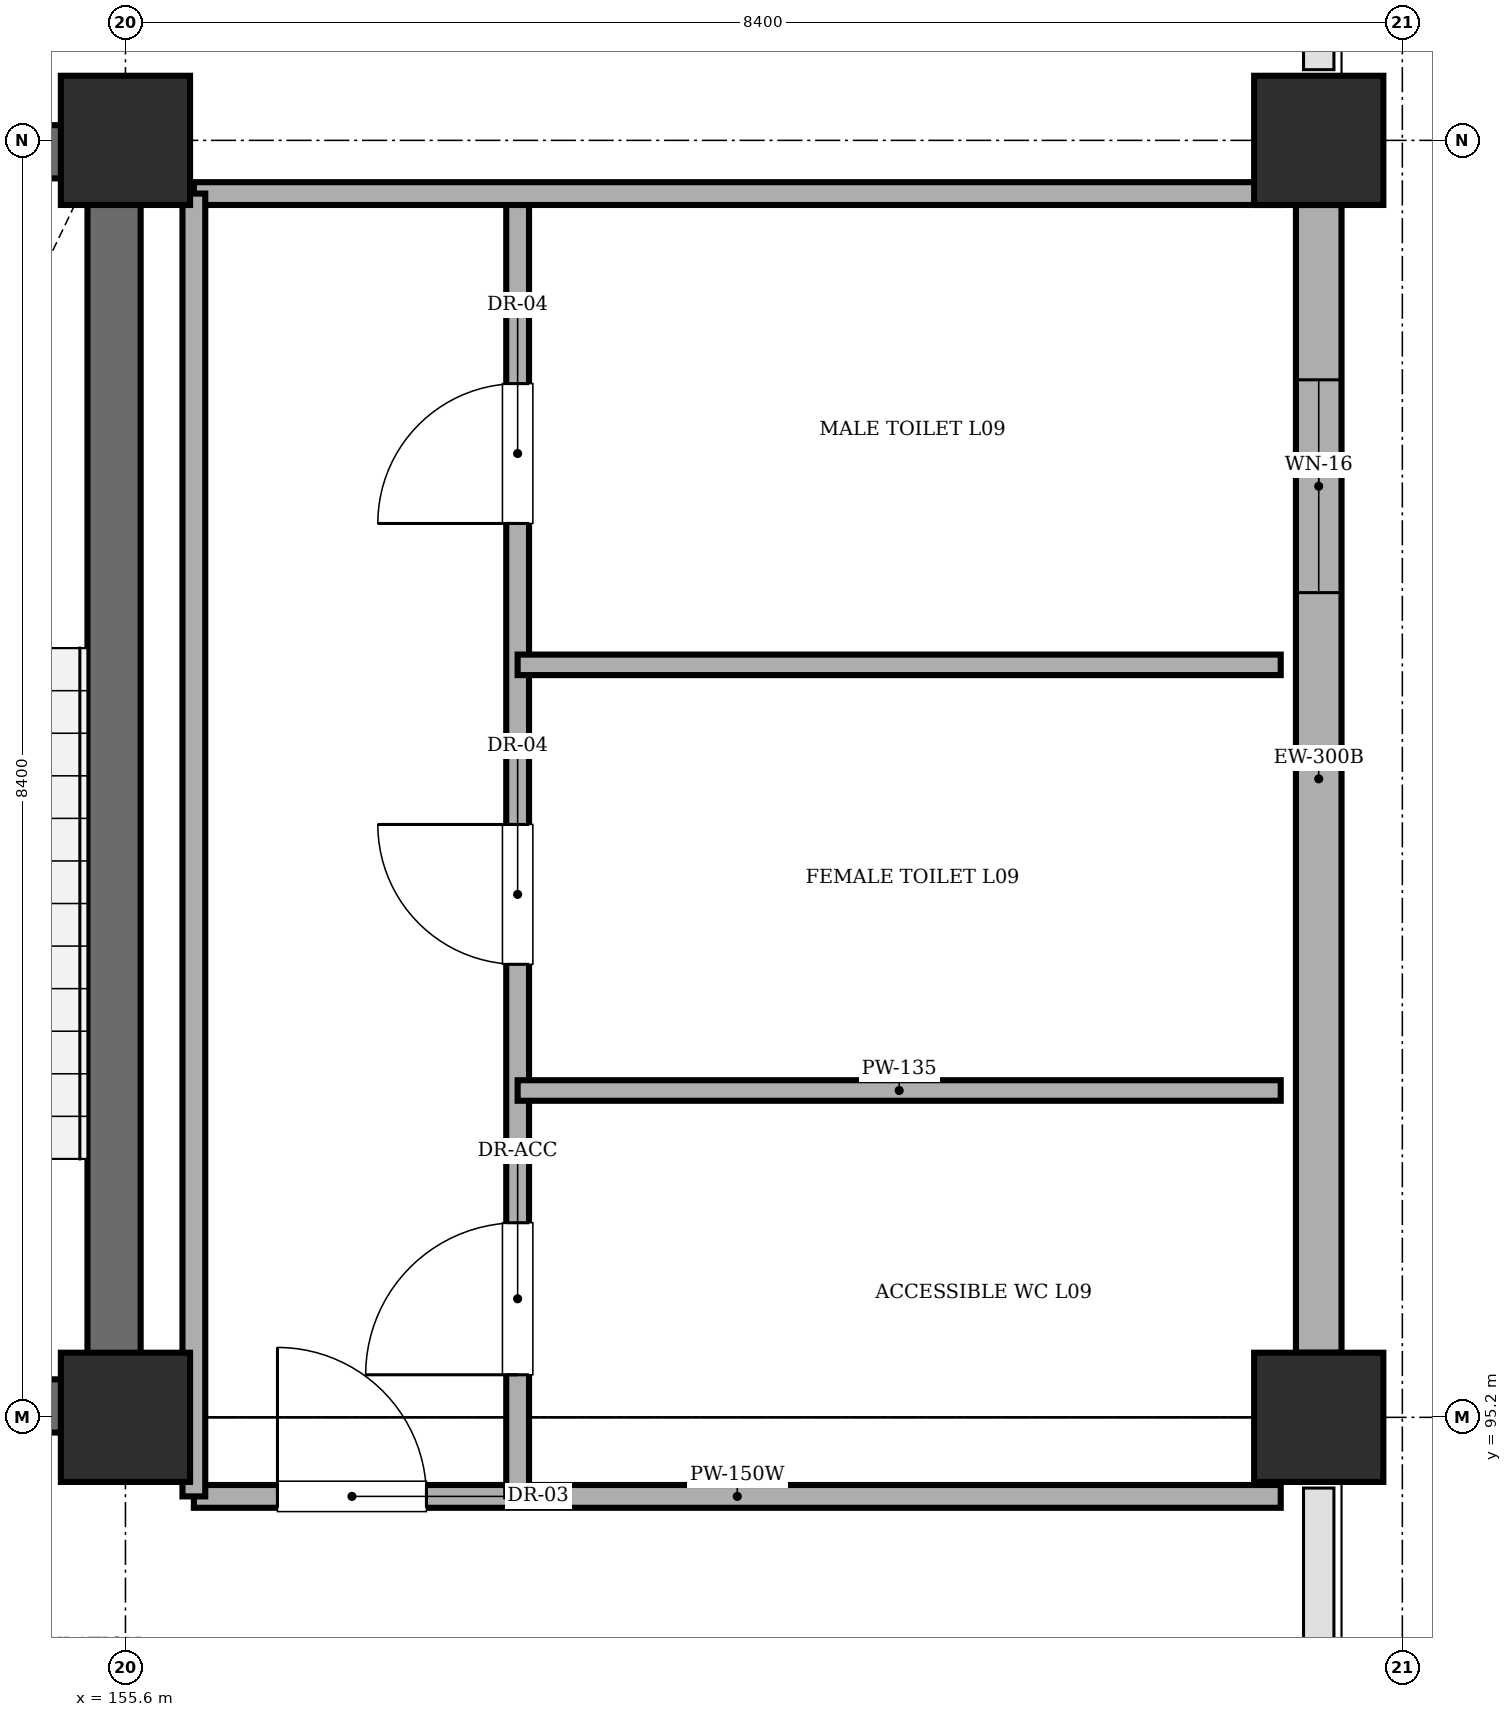
"""IFC4 building model, lengths in metres.
Left out: names, types, materials, properties, quantities, classifications, styles, units other than length and angle.
Written with IfcOpenShell. Run it as: python <this file> out.ifc"""

import sys

from ifc_helpers import new_model, si_unit, direction, frame, frame_2d, origin, origin_2d, place, context, subcontext, project, spatial, rectangle, extrude, element, fill, save


model = new_model("IFC4")
c1 = context("Model", 3, precision=1e-05, world=origin(), true_north=direction((0.0, 1.0)))
c2 = subcontext(c1, "Body", "Model", "MODEL_VIEW")
j1 = project(units=[si_unit("LENGTHUNIT", "METRE"), si_unit("PLANEANGLEUNIT", "RADIAN")], contexts=[c1])
p1 = place(None, origin())
s1 = spatial("IfcSite", under=j1, at=p1, CompositionType="ELEMENT")
p2 = place(p1, origin())
s2 = spatial("IfcBuilding", under=s1, at=p2, CompositionType="ELEMENT")
p3 = place(p2, frame((0.0, 0.0, 36.0)))
s3 = spatial("IfcBuildingStorey", under=s2, at=p3, CompositionType="ELEMENT", Elevation=36.0)
for number, where, z_axis, x_axis in (
    (1, (155.6, 95.2, 0.0), (0.0, 0.0, 1.0), (1.0, 0.0, 0.0)),
    (2, (155.6, 103.6, 0.0), (0.0, 0.0, 1.0), (1.0, 0.0, 0.0)),
    (3, (163.45, 95.2, 0.0), (0.0, 0.0, 1.0), (1.0, 0.0, 0.0)),
    (4, (163.45, 103.6, 0.0), (0.0, 0.0, 1.0), (1.0, 0.0, 0.0)),
):
    element("IfcColumn", number, at=place(p3, frame(where, z_axis=z_axis, x_axis=x_axis)), inside=s3, PredefinedType="COLUMN", context=c2, shape_type="SweptSolid", body=[
        extrude(rectangle(XDim=0.85, YDim=0.85, at=origin_2d()), origin(), (0.0, 0.0, 1.0), 4.02),
    ])
for number, where, z_axis, x_axis in (
    (5, (151.9, 95.275, 0.0), (0.0, 0.0, 1.0), (1.0, 0.0, 0.0)),
    (6, (151.9, 103.525, 0.0), (0.0, 0.0, 1.0), (1.0, 0.0, 0.0)),
):
    element("IfcWall", number, at=place(p3, frame(where, z_axis=z_axis, x_axis=x_axis)), inside=s3, PredefinedType="SHEAR", context=c2, shape_type="SweptSolid", body=[
        extrude(rectangle(XDim=3.8, YDim=0.35, at=frame_2d((1.9, 0.0))), origin(), (0.0, 0.0, 1.0), 4.02),
    ])
p4 = place(p3, frame((155.525, 95.45, 0.0), z_axis=(0.0, 0.0, 1.0), x_axis=(0.0, 1.0, 0.0)))
e7 = element("IfcWall", 7, at=p4, inside=s3, PredefinedType="SHEAR", context=c2, shape_type="SweptSolid", body=[
    extrude(rectangle(XDim=7.9, YDim=0.35, at=frame_2d((3.95, 0.0))), origin(), (0.0, 0.0, 1.0), 4.02),
])
p5 = place(p3, frame((163.45, 103.175, 0.0), z_axis=(0.0, 0.0, 1.0), x_axis=(0.0, -1.0, 0.0)))
e8 = element("IfcWall", 8, at=p5, inside=s3, PredefinedType="STANDARD", context=c2, shape_type="SweptSolid", body=[
    extrude(rectangle(XDim=7.55, YDim=0.3, at=frame_2d((3.775, 0.0))), origin(), (0.0, 0.0, 1.0), 3.32),
])
p6 = place(p5, frame((1.15, 0.0, 1.1)))
e9 = element("IfcOpeningElement", 9, at=p6, cuts=e8, PredefinedType="OPENING", context=c2, shape_type="SweptSolid", body=[
    extrude(rectangle(XDim=1.4, YDim=1.4, at=frame_2d((0.7, 0.7))), frame((0.0, 0.16, 0.0), z_axis=(0.0, -1.0, 0.0), x_axis=(1.0, 0.0, 0.0)), (0.0, 0.0, 1.0), 0.32),
])
p7 = place(p3, frame((156.05, 94.68, 0.0), z_axis=(0.0, 0.0, 1.0), x_axis=(1.0, 0.0, 0.0)))
e10 = element("IfcWall", 10, at=p7, inside=s3, PredefinedType="PARTITIONING", context=c2, shape_type="SweptSolid", body=[
    extrude(rectangle(XDim=7.15, YDim=0.15, at=frame_2d((3.575, 0.0))), origin(), (0.0, 0.0, 1.0), 4.02),
])
p8 = place(p7, frame((0.55, 0.0, 0.0)))
e11 = element("IfcOpeningElement", 11, at=p8, cuts=e10, PredefinedType="OPENING", context=c2, shape_type="SweptSolid", body=[
    extrude(rectangle(XDim=0.98, YDim=2.12, at=frame_2d((0.49, 1.06))), frame((0.0, 0.085, 0.0), z_axis=(0.0, -1.0, 0.0), x_axis=(1.0, 0.0, 0.0)), (0.0, 0.0, 1.0), 0.17),
])
p9 = place(p3, frame((158.18, 94.68, 0.0), z_axis=(0.0, 0.0, 1.0), x_axis=(0.0, 1.0, 0.0)))
e12 = element("IfcWall", 12, at=p9, inside=s3, PredefinedType="PARTITIONING", context=c2, shape_type="SweptSolid", body=[
    extrude(rectangle(XDim=8.57, YDim=0.15, at=frame_2d((4.285, 0.0))), origin(), (0.0, 0.0, 1.0), 4.02),
])
p10 = place(p9, frame((0.8, 0.0, 0.0)))
e13 = element("IfcOpeningElement", 13, at=p10, cuts=e12, PredefinedType="OPENING", context=c2, shape_type="SweptSolid", body=[
    extrude(rectangle(XDim=1.0, YDim=2.12, at=frame_2d((0.5, 1.06))), frame((0.0, 0.085, 0.0), z_axis=(0.0, -1.0, 0.0), x_axis=(1.0, 0.0, 0.0)), (0.0, 0.0, 1.0), 0.17),
])
p11 = place(p9, frame((3.5, 0.0, 0.0)))
e14 = element("IfcOpeningElement", 14, at=p11, cuts=e12, PredefinedType="OPENING", context=c2, shape_type="SweptSolid", body=[
    extrude(rectangle(XDim=0.92, YDim=2.1, at=frame_2d((0.46, 1.05))), frame((0.0, 0.085, 0.0), z_axis=(0.0, -1.0, 0.0), x_axis=(1.0, 0.0, 0.0)), (0.0, 0.0, 1.0), 0.17),
])
p12 = place(p9, frame((6.4, 0.0, 0.0)))
e15 = element("IfcOpeningElement", 15, at=p12, cuts=e12, PredefinedType="OPENING", context=c2, shape_type="SweptSolid", body=[
    extrude(rectangle(XDim=0.92, YDim=2.1, at=frame_2d((0.46, 1.05))), frame((0.0, 0.085, 0.0), z_axis=(0.0, -1.0, 0.0), x_axis=(1.0, 0.0, 0.0)), (0.0, 0.0, 1.0), 0.17),
])
for number, where, z_axis, x_axis in (
    (16, (158.18, 97.35, 0.0), (0.0, 0.0, 1.0), (1.0, 0.0, 0.0)),
    (17, (158.18, 100.15, 0.0), (0.0, 0.0, 1.0), (1.0, 0.0, 0.0)),
):
    element("IfcWall", number, at=place(p3, frame(where, z_axis=z_axis, x_axis=x_axis)), inside=s3, PredefinedType="PARTITIONING", context=c2, shape_type="SweptSolid", body=[
        extrude(rectangle(XDim=5.02, YDim=0.135, at=frame_2d((2.51, 0.0))), origin(), (0.0, 0.0, 1.0), 4.02),
    ])
p13 = place(p3, frame((156.05, 103.25, 0.0), z_axis=(0.0, 0.0, 1.0), x_axis=(1.0, 0.0, 0.0)))
e18 = element("IfcWall", 18, at=p13, inside=s3, PredefinedType="PARTITIONING", context=c2, shape_type="SweptSolid", body=[
    extrude(rectangle(XDim=7.15, YDim=0.15, at=frame_2d((3.575, 0.0))), origin(), (0.0, 0.0, 1.0), 4.02),
])
p14 = place(p3, frame((156.05, 94.68, 0.0), z_axis=(0.0, 0.0, 1.0), x_axis=(0.0, 1.0, 0.0)))
e19 = element("IfcWall", 19, at=p14, inside=s3, PredefinedType="PARTITIONING", context=c2, shape_type="SweptSolid", body=[
    extrude(rectangle(XDim=8.57, YDim=0.15, at=frame_2d((4.285, 0.0))), origin(), (0.0, 0.0, 1.0), 4.02),
])
p15 = place(p6, origin())
e20 = element("IfcWindow", 20, at=p15, inside=s3, PartitioningType="SINGLE_PANEL", PredefinedType="WINDOW", context=c2, shape_type="SweptSolid", body=[
    extrude(rectangle(XDim=1.4, YDim=1.4, at=frame_2d((0.7, 0.7))), frame((0.0, 0.03, 0.0), z_axis=(0.0, -1.0, 0.0), x_axis=(1.0, 0.0, 0.0)), (0.0, 0.0, 1.0), 0.06),
])
fill(e9, e20)
p16 = place(p8, origin())
e21 = element("IfcDoor", 21, at=p16, inside=s3, OperationType="SINGLE_SWING_LEFT", PredefinedType="DOOR", context=c2, shape_type="SweptSolid", body=[
    extrude(rectangle(XDim=0.98, YDim=2.12, at=frame_2d((0.49, 1.06))), frame((0.0, 0.025, 0.0), z_axis=(0.0, -1.0, 0.0), x_axis=(1.0, 0.0, 0.0)), (0.0, 0.0, 1.0), 0.05),
])
fill(e11, e21)
p17 = place(p10, origin())
e22 = element("IfcDoor", 22, at=p17, inside=s3, OperationType="SINGLE_SWING_LEFT", PredefinedType="DOOR", context=c2, shape_type="SweptSolid", body=[
    extrude(rectangle(XDim=1.0, YDim=2.12, at=frame_2d((0.5, 1.06))), frame((0.0, 0.025, 0.0), z_axis=(0.0, -1.0, 0.0), x_axis=(1.0, 0.0, 0.0)), (0.0, 0.0, 1.0), 0.05),
])
fill(e13, e22)
p18 = place(p11, origin())
e23 = element("IfcDoor", 23, at=p18, inside=s3, OperationType="SINGLE_SWING_RIGHT", PredefinedType="DOOR", context=c2, shape_type="SweptSolid", body=[
    extrude(rectangle(XDim=0.92, YDim=2.1, at=frame_2d((0.46, 1.05))), frame((0.0, 0.025, 0.0), z_axis=(0.0, -1.0, 0.0), x_axis=(1.0, 0.0, 0.0)), (0.0, 0.0, 1.0), 0.05),
])
fill(e14, e23)
p19 = place(p12, origin())
e24 = element("IfcDoor", 24, at=p19, inside=s3, OperationType="SINGLE_SWING_LEFT", PredefinedType="DOOR", context=c2, shape_type="SweptSolid", body=[
    extrude(rectangle(XDim=0.92, YDim=2.1, at=frame_2d((0.46, 1.05))), frame((0.0, 0.025, 0.0), z_axis=(0.0, -1.0, 0.0), x_axis=(1.0, 0.0, 0.0)), (0.0, 0.0, 1.0), 0.05),
])
fill(e15, e24)
save(model, sys.argv[1])
